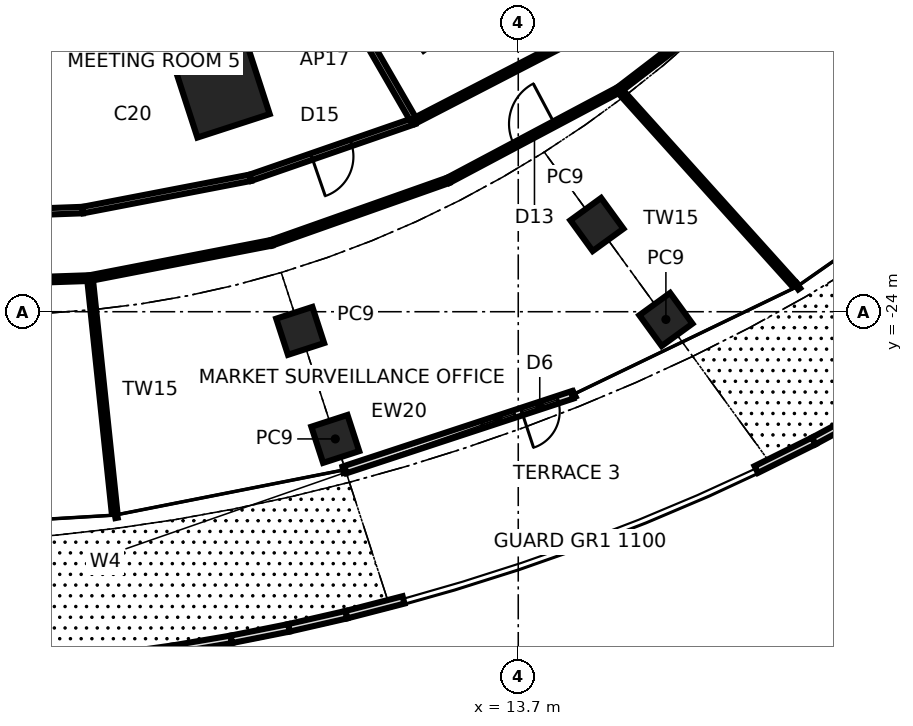
"""IFC4 building model, lengths in metres.
Left out: names, types, materials, properties, quantities, classifications, styles, units other than length and angle.
Written with IfcOpenShell. Run it as: python <this file> out.ifc"""

import sys

from ifc_helpers import new_model, si_unit, direction, frame, frame_2d, origin, origin_2d, place, context, subcontext, project, spatial, rectangle, extrude, element, fill, save


model = new_model("IFC4")
c1 = context("Model", 3, precision=1e-05, world=origin(), true_north=direction((0.0, 1.0)))
c2 = subcontext(c1, "Body", "Model", "MODEL_VIEW")
j1 = project(units=[si_unit("LENGTHUNIT", "METRE"), si_unit("PLANEANGLEUNIT", "RADIAN")], contexts=[c1])
p1 = place(None, origin())
s1 = spatial("IfcSite", under=j1, at=p1, CompositionType="ELEMENT")
p2 = place(p1, origin())
s2 = spatial("IfcBuilding", under=s1, at=p2, CompositionType="ELEMENT")
p3 = place(p2, frame((0.0, 0.0, 10.6)))
s3 = spatial("IfcBuildingStorey", under=s2, at=p3, CompositionType="ELEMENT", Elevation=10.6)
p4 = place(p3, frame((5.9, -18.157, 0.0), z_axis=(0.0, 0.0, 1.0), x_axis=(0.309016994375, -0.951056516295, 0.0)))
e1 = element("IfcColumn", 1, at=p4, inside=s3, PredefinedType="COLUMN", context=c2, shape_type="SweptSolid", body=[
    extrude(rectangle(XDim=2.0, YDim=2.0, at=origin_2d()), origin(), (0.0, 0.0, 1.0), 4.5),
])
for number, where, z_axis, x_axis in (
    (2, (8.886, -27.347, 0.0), (0.0, 0.0, 1.0), (0.309, -0.951, 0.0)),
    (3, (17.585, -24.204, 0.0), (0.0, 0.0, 1.0), (0.588, -0.809, 0.0)),
    (4, (7.962, -24.504, 0.0), (0.0, 0.0, 1.0), (0.309, -0.951, 0.0)),
    (5, (15.77, -21.705, 0.0), (0.0, 0.0, 1.0), (0.588, -0.809, 0.0)),
):
    element("IfcColumn", number, at=place(p3, frame(where, z_axis=z_axis, x_axis=x_axis)), inside=s3, PredefinedType="COLUMN", context=c2, shape_type="SweptSolid", body=[
        extrude(rectangle(XDim=1.0, YDim=1.0, at=origin_2d()), origin(), (0.0, 0.0, 1.0), 4.5),
    ])
p5 = place(p3, frame((9.148, -28.156, 0.0), z_axis=(0.0, 0.0, 1.0), x_axis=(0.949868601524, 0.312649388034, 0.0)))
e6 = element("IfcWall", 6, at=p5, inside=s3, PredefinedType="SOLIDWALL", context=c2, shape_type="SweptSolid", body=[
    extrude(rectangle(XDim=6.288, YDim=0.2, at=frame_2d((3.144, 0.0))), origin(), (0.0, 0.0, 1.0), 4.3),
])
p6 = place(p5, frame((4.888, 0.0, 0.0)))
e7 = element("IfcOpeningElement", 7, at=p6, cuts=e6, PredefinedType="OPENING", context=c2, shape_type="SweptSolid", body=[
    extrude(rectangle(XDim=1.0, YDim=2.4, at=frame_2d((0.5, 1.2))), frame((0.0, 0.11, 0.0), z_axis=(0.0, -1.0, 0.0), x_axis=(1.0, 0.0, 0.0)), (0.0, 0.0, 1.0), 0.22),
])
p7 = place(p5, frame((3.788, 0.0, 0.3)))
e8 = element("IfcOpeningElement", 8, at=p7, cuts=e6, PredefinedType="OPENING", context=c2, shape_type="SweptSolid", body=[
    extrude(rectangle(XDim=0.9, YDim=2.1, at=frame_2d((0.45, 1.05))), frame((0.0, 0.11, 0.0), z_axis=(0.0, -1.0, 0.0), x_axis=(1.0, 0.0, 0.0)), (0.0, 0.0, 1.0), 0.22),
])
p8 = place(p5, frame((4.888, 0.0, 2.7)))
e9 = element("IfcOpeningElement", 9, at=p8, cuts=e6, PredefinedType="OPENING", context=c2, shape_type="SweptSolid", body=[
    extrude(rectangle(XDim=1.0, YDim=0.6, at=frame_2d((0.5, 0.3))), frame((0.0, 0.11, 0.0), z_axis=(0.0, -1.0, 0.0), x_axis=(1.0, 0.0, 0.0)), (0.0, 0.0, 1.0), 0.22),
])
p9 = place(p3, frame((3.093, -33.094, 0.0), z_axis=(0.0, 0.0, 1.0), x_axis=(0.990410918313, 0.13815286058, 0.0)))
e10 = element("IfcWall", 10, at=p9, inside=s3, PredefinedType="PARAPET", context=c2, shape_type="SweptSolid", body=[
    extrude(rectangle(XDim=1.548, YDim=0.2, at=frame_2d((0.774, 0.0))), origin(), (0.0, 0.0, 1.0), 1.1),
])
p10 = place(p3, frame((4.626, -32.88, 0.0), z_axis=(0.0, 0.0, 1.0), x_axis=(0.985872795835, 0.167495762431, 0.0)))
e11 = element("IfcWall", 11, at=p10, inside=s3, PredefinedType="PARAPET", context=c2, shape_type="SweptSolid", body=[
    extrude(rectangle(XDim=1.546, YDim=0.2, at=frame_2d((0.773, 0.0))), origin(), (0.0, 0.0, 1.0), 1.1),
])
p11 = place(p3, frame((6.15, -32.621, 0.0), z_axis=(0.0, 0.0, 1.0), x_axis=(0.980635264408, 0.195842993745, 0.0)))
e12 = element("IfcWall", 12, at=p11, inside=s3, PredefinedType="PARAPET", context=c2, shape_type="SweptSolid", body=[
    extrude(rectangle(XDim=1.547, YDim=0.2, at=frame_2d((0.773, 0.0))), origin(), (0.0, 0.0, 1.0), 1.1),
])
p12 = place(p3, frame((7.667, -32.318, 0.0), z_axis=(0.0, 0.0, 1.0), x_axis=(0.974745899431, 0.223316885933, 0.0)))
e13 = element("IfcWall", 13, at=p12, inside=s3, PredefinedType="PARAPET", context=c2, shape_type="SweptSolid", body=[
    extrude(rectangle(XDim=1.549, YDim=0.2, at=frame_2d((0.774, 0.0))), origin(), (0.0, 0.0, 1.0), 1.1),
])
p13 = place(p3, frame((9.177, -31.972, 0.0), z_axis=(0.0, 0.0, 1.0), x_axis=(0.968188939365, 0.250220258355, 0.0)))
e14 = element("IfcWall", 14, at=p13, inside=s3, PredefinedType="PARAPET", context=c2, shape_type="SweptSolid", body=[
    extrude(rectangle(XDim=1.553, YDim=0.2, at=frame_2d((0.777, 0.0))), origin(), (0.0, 0.0, 1.0), 1.1),
])
p14 = place(p3, frame((19.962, -28.152, 0.0), z_axis=(0.0, 0.0, 1.0), x_axis=(0.895549025749, 0.44496285517, 0.0)))
e15 = element("IfcWall", 15, at=p14, inside=s3, PredefinedType="PARAPET", context=c2, shape_type="SweptSolid", body=[
    extrude(rectangle(XDim=1.693, YDim=0.2, at=frame_2d((0.847, 0.0))), origin(), (0.0, 0.0, 1.0), 1.1),
])
p15 = place(p3, frame((21.479, -27.399, 0.0), z_axis=(0.0, 0.0, 1.0), x_axis=(0.879935184484, 0.475093749809, 0.0)))
e16 = element("IfcWall", 16, at=p15, inside=s3, PredefinedType="PARAPET", context=c2, shape_type="SweptSolid", body=[
    extrude(rectangle(XDim=1.713, YDim=0.2, at=frame_2d((0.857, 0.0))), origin(), (0.0, 0.0, 1.0), 1.1),
])
p16 = place(p3, frame((2.241, -21.325, 0.0), z_axis=(0.0, 0.0, 1.0), x_axis=(-0.999316169957, -0.03697556575, 0.0)))
e17 = element("IfcWall", 17, at=p16, inside=s3, PredefinedType="PARTITIONING", context=c2, shape_type="SweptSolid", body=[
    extrude(rectangle(XDim=4.503, YDim=0.17, at=frame_2d((2.251, 0.0))), origin(), (0.0, 0.0, 1.0), 4.3),
])
p17 = place(p3, frame((-2.447, -23.281, 0.0), z_axis=(0.0, 0.0, 1.0), x_axis=(0.999419294802, 0.034074523869, 0.0)))
e18 = element("IfcWall", 18, at=p17, inside=s3, PredefinedType="PARTITIONING", context=c2, shape_type="SweptSolid", body=[
    extrude(rectangle(XDim=4.879, YDim=0.15, at=frame_2d((2.44, 0.0))), origin(), (0.0, 0.0, 1.0), 4.3),
])
p18 = place(p3, frame((2.429, -23.115, 0.0), z_axis=(0.0, 0.0, 1.0), x_axis=(0.104522643755, -0.994522507006, 0.0)))
e19 = element("IfcWall", 19, at=p18, inside=s3, PredefinedType="PARTITIONING", context=c2, shape_type="SweptSolid", body=[
    extrude(rectangle(XDim=6.192, YDim=0.15, at=frame_2d((3.096, 0.0))), origin(), (0.0, 0.0, 1.0), 4.3),
])
p19 = place(p3, frame((2.429, -23.115, 0.0), z_axis=(0.0, 0.0, 1.0), x_axis=(0.981647737098, 0.190703225592, 0.0)))
e20 = element("IfcWall", 20, at=p19, inside=s3, PredefinedType="PARTITIONING", context=c2, shape_type="SweptSolid", body=[
    extrude(rectangle(XDim=4.869, YDim=0.15, at=frame_2d((2.434, 0.0))), origin(), (0.0, 0.0, 1.0), 4.3),
])
p20 = place(p3, frame((6.653, -20.475, 0.0), z_axis=(0.0, 0.0, 1.0), x_axis=(-0.981933890717, -0.189224296169, 0.0)))
e21 = element("IfcWall", 21, at=p20, inside=s3, PredefinedType="PARTITIONING", context=c2, shape_type="SweptSolid", body=[
    extrude(rectangle(XDim=4.492, YDim=0.17, at=frame_2d((2.246, 0.0))), origin(), (0.0, 0.0, 1.0), 4.3),
])
p21 = place(p3, frame((7.209, -22.187, 0.0), z_axis=(0.0, 0.0, 1.0), x_axis=(0.94280197492, 0.333353320197, 0.0)))
e22 = element("IfcWall", 22, at=p21, inside=s3, PredefinedType="PARTITIONING", context=c2, shape_type="SweptSolid", body=[
    extrude(rectangle(XDim=4.933, YDim=0.15, at=frame_2d((2.467, 0.0))), origin(), (0.0, 0.0, 1.0), 4.3),
])
p22 = place(p3, frame((10.96, -18.983, 0.0), z_axis=(0.0, 0.0, 1.0), x_axis=(-0.944956141071, -0.327197022377, 0.0)))
e23 = element("IfcWall", 23, at=p22, inside=s3, PredefinedType="PARTITIONING", context=c2, shape_type="SweptSolid", body=[
    extrude(rectangle(XDim=4.558, YDim=0.17, at=frame_2d((2.279, 0.0))), origin(), (0.0, 0.0, 1.0), 4.3),
])
p23 = place(p22, frame((1.754, 0.0, 0.0)))
e24 = element("IfcOpeningElement", 24, at=p23, cuts=e23, PredefinedType="OPENING", context=c2, shape_type="SweptSolid", body=[
    extrude(rectangle(XDim=1.1, YDim=2.4, at=frame_2d((0.55, 1.2))), frame((0.0, 0.095, 0.0), z_axis=(0.0, -1.0, 0.0), x_axis=(1.0, 0.0, 0.0)), (0.0, 0.0, 1.0), 0.19),
])
p24 = place(p3, frame((10.96, -18.983, 0.0), z_axis=(0.0, 0.0, 1.0), x_axis=(-0.500001430823, 0.866024577697, 0.0)))
e25 = element("IfcWall", 25, at=p24, inside=s3, PredefinedType="PARTITIONING", context=c2, shape_type="SweptSolid", body=[
    extrude(rectangle(XDim=5.126, YDim=0.17, at=frame_2d((2.563, 0.0))), origin(), (0.0, 0.0, 1.0), 4.3),
])
p25 = place(p3, frame((11.86, -20.542, 0.0), z_axis=(0.0, 0.0, 1.0), x_axis=(0.883167950269, 0.469056895928, 0.0)))
e26 = element("IfcWall", 26, at=p25, inside=s3, PredefinedType="PARTITIONING", context=c2, shape_type="SweptSolid", body=[
    extrude(rectangle(XDim=5.083, YDim=0.15, at=frame_2d((2.542, 0.0))), origin(), (0.0, 0.0, 1.0), 4.3),
])
p26 = place(p25, frame((1.967, 0.0, 0.0)))
e27 = element("IfcOpeningElement", 27, at=p26, cuts=e26, PredefinedType="OPENING", context=c2, shape_type="SweptSolid", body=[
    extrude(rectangle(XDim=1.2, YDim=2.4, at=frame_2d((0.6, 1.2))), frame((0.0, 0.085, 0.0), z_axis=(0.0, -1.0, 0.0), x_axis=(1.0, 0.0, 0.0)), (0.0, 0.0, 1.0), 0.17),
])
p27 = place(p3, frame((15.145, -16.82, 0.0), z_axis=(0.0, 0.0, 1.0), x_axis=(-0.888324088064, -0.459217066935, 0.0)))
e28 = element("IfcWall", 28, at=p27, inside=s3, PredefinedType="PARTITIONING", context=c2, shape_type="SweptSolid", body=[
    extrude(rectangle(XDim=4.711, YDim=0.15, at=frame_2d((2.355, 0.0))), origin(), (0.0, 0.0, 1.0), 4.3),
])
p28 = place(p3, frame((20.969, -23.288, 0.0), z_axis=(0.0, 0.0, 1.0), x_axis=(-0.669150311089, 0.743127082785, 0.0)))
e29 = element("IfcWall", 29, at=p28, inside=s3, PredefinedType="PARTITIONING", context=c2, shape_type="SweptSolid", body=[
    extrude(rectangle(XDim=6.904, YDim=0.15, at=frame_2d((3.452, 0.0))), origin(), (0.0, 0.0, 1.0), 4.3),
])
p29 = place(p3, frame((16.349, -18.158, 0.0), z_axis=(0.0, 0.0, 1.0), x_axis=(0.793951005075, 0.607981744414, 0.0)))
e30 = element("IfcWall", 30, at=p29, inside=s3, PredefinedType="PARTITIONING", context=c2, shape_type="SweptSolid", body=[
    extrude(rectangle(XDim=5.3, YDim=0.15, at=frame_2d((2.65, 0.0))), origin(), (0.0, 0.0, 1.0), 4.3),
])
p30 = place(p6, frame((1.0, 0.0, 0.0), z_axis=(0.0, 0.0, 1.0), x_axis=(-1.0, 0.0, 0.0)))
e31 = element("IfcDoor", 31, at=p30, inside=s3, OperationType="SINGLE_SWING_RIGHT", PredefinedType="DOOR", context=c2, shape_type="SweptSolid", body=[
    extrude(rectangle(XDim=1.0, YDim=2.4, at=frame_2d((0.5, 1.2))), frame((0.0, 0.025, 0.0), z_axis=(0.0, -1.0, 0.0), x_axis=(1.0, 0.0, 0.0)), (0.0, 0.0, 1.0), 0.05),
])
fill(e7, e31)
p31 = place(p7, origin())
e32 = element("IfcWindow", 32, at=p31, inside=s3, PartitioningType="SINGLE_PANEL", PredefinedType="WINDOW", context=c2, shape_type="SweptSolid", body=[
    extrude(rectangle(XDim=0.9, YDim=2.1, at=frame_2d((0.45, 1.05))), frame((0.0, 0.03, 0.0), z_axis=(0.0, -1.0, 0.0), x_axis=(1.0, 0.0, 0.0)), (0.0, 0.0, 1.0), 0.06),
])
fill(e8, e32)
p32 = place(p8, origin())
e33 = element("IfcWindow", 33, at=p32, inside=s3, PartitioningType="SINGLE_PANEL", PredefinedType="WINDOW", context=c2, shape_type="SweptSolid", body=[
    extrude(rectangle(XDim=1.0, YDim=0.6, at=frame_2d((0.5, 0.3))), frame((0.0, 0.03, 0.0), z_axis=(0.0, -1.0, 0.0), x_axis=(1.0, 0.0, 0.0)), (0.0, 0.0, 1.0), 0.06),
])
fill(e9, e33)
p33 = place(p23, origin())
e34 = element("IfcDoor", 34, at=p33, inside=s3, OperationType="SINGLE_SWING_RIGHT", PredefinedType="DOOR", context=c2, shape_type="SweptSolid", body=[
    extrude(rectangle(XDim=1.1, YDim=2.4, at=frame_2d((0.55, 1.2))), frame((0.0, 0.025, 0.0), z_axis=(0.0, -1.0, 0.0), x_axis=(1.0, 0.0, 0.0)), (0.0, 0.0, 1.0), 0.05),
])
fill(e24, e34)
p34 = place(p26, origin())
e35 = element("IfcDoor", 35, at=p34, inside=s3, OperationType="SINGLE_SWING_RIGHT", PredefinedType="DOOR", context=c2, shape_type="SweptSolid", body=[
    extrude(rectangle(XDim=1.2, YDim=2.4, at=frame_2d((0.6, 1.2))), frame((0.0, 0.025, 0.0), z_axis=(0.0, -1.0, 0.0), x_axis=(1.0, 0.0, 0.0)), (0.0, 0.0, 1.0), 0.05),
])
fill(e27, e35)
save(model, sys.argv[1])
